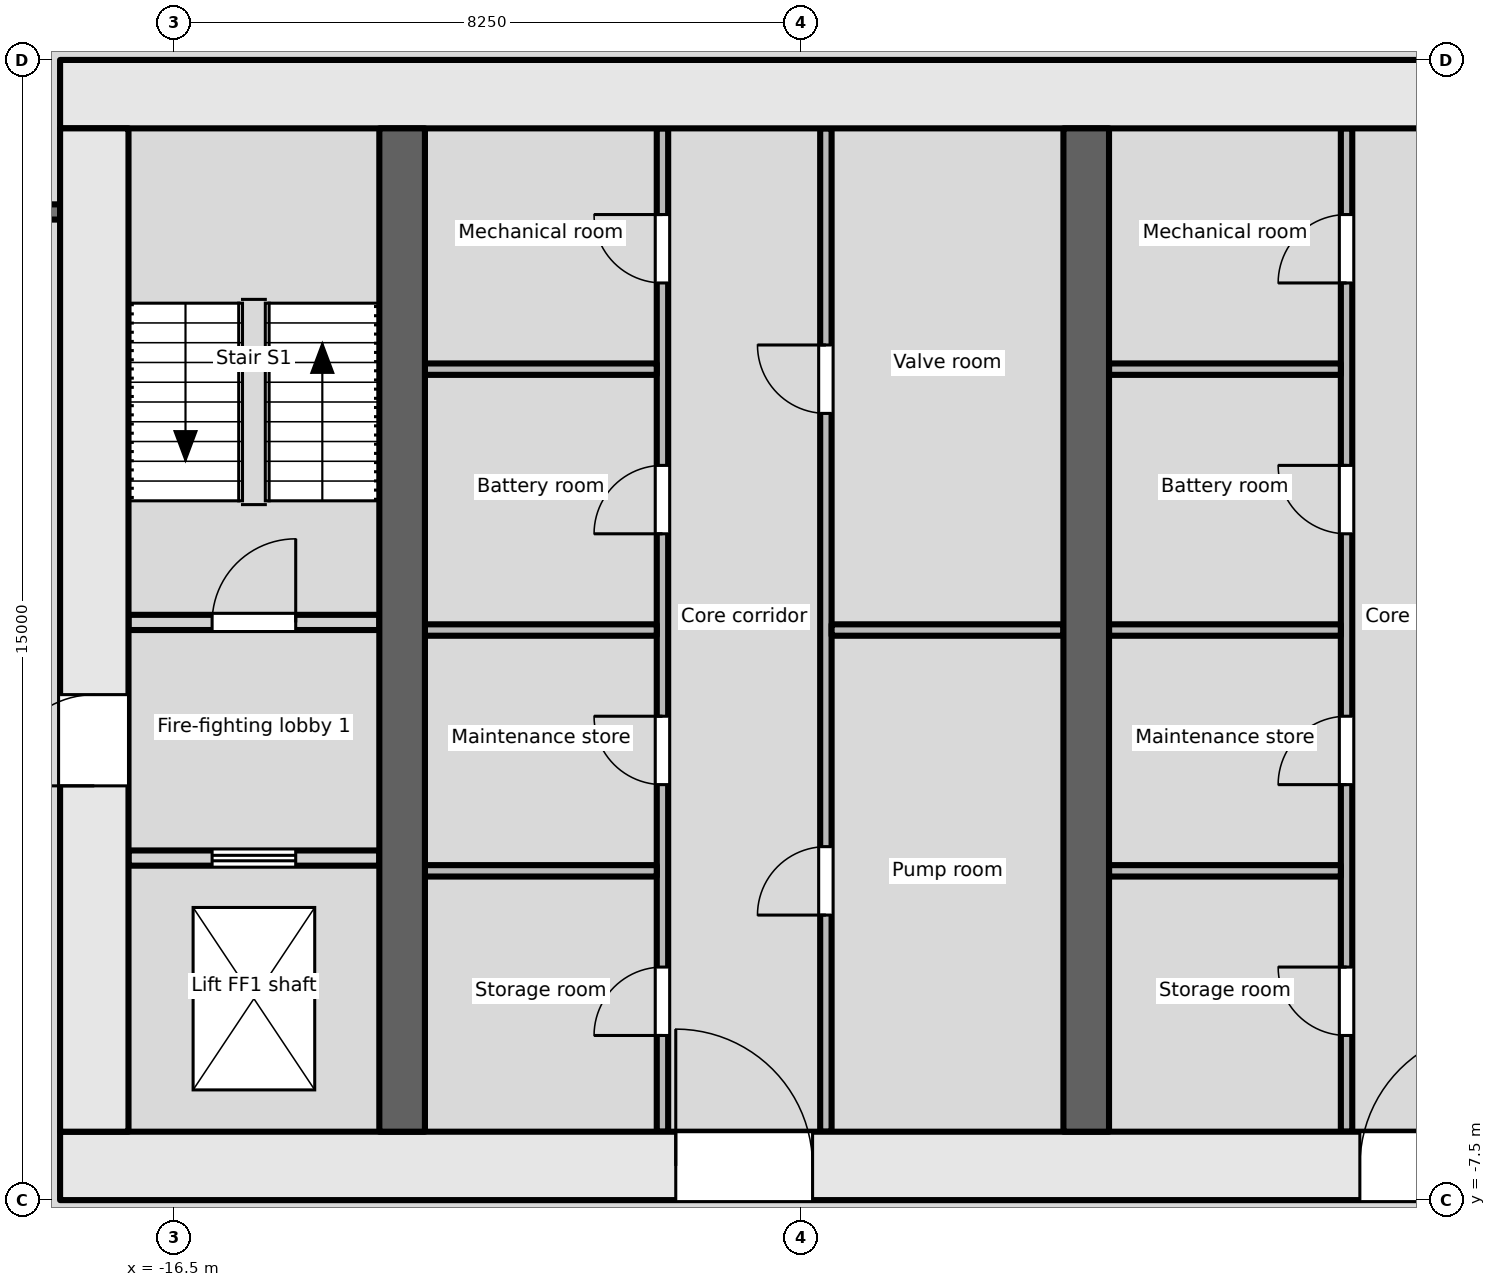
"""IFC4 building model, lengths in metres.
Left out: names, types, materials, properties, quantities, classifications, styles, units other than length and angle.
Written with IfcOpenShell. Run it as: python <this file> out.ifc"""

import sys

from ifc_helpers import new_model, si_unit, direction, frame, frame_2d, origin, place, context, subcontext, project, spatial, rectangle, extrude, element, fill, save


model = new_model("IFC4")
c1 = context("Model", 3, precision=1e-05, world=origin(), true_north=direction((0.0, 1.0)))
c2 = subcontext(c1, "Body", "Model", "MODEL_VIEW")
j1 = project(units=[si_unit("LENGTHUNIT", "METRE"), si_unit("PLANEANGLEUNIT", "RADIAN")], contexts=[c1])
p1 = place(None, origin())
s1 = spatial("IfcSite", under=j1, at=p1, CompositionType="ELEMENT")
p2 = place(p1, origin())
s2 = spatial("IfcBuilding", under=s1, at=p2, CompositionType="ELEMENT")
p3 = place(p2, frame((0.0, 0.0, -13.5)))
s3 = spatial("IfcBuildingStorey", under=s2, at=p3, CompositionType="ELEMENT", Elevation=-13.5)
p4 = place(p3, frame((-18.0, -7.05, -0.2), z_axis=(0.0, 0.0, 1.0), x_axis=(1.0, 0.0, 0.0)))
e1 = element("IfcWall", 1, at=p4, inside=s3, PredefinedType="SHEAR", context=c2, shape_type="SweptSolid", body=[
    extrude(rectangle(XDim=36.0, YDim=0.9, at=frame_2d((18.0, 0.0))), origin(), (0.0, 0.0, 1.0), 4.0),
])
p5 = place(p4, frame((8.1, 0.0, 0.2)))
e2 = element("IfcOpeningElement", 2, at=p5, cuts=e1, PredefinedType="OPENING", context=c2, shape_type="SweptSolid", body=[
    extrude(rectangle(XDim=1.8, YDim=2.1, at=frame_2d((0.9, 1.05))), frame((0.0, 0.46, 0.0), z_axis=(0.0, -1.0, 0.0), x_axis=(1.0, 0.0, 0.0)), (0.0, 0.0, 1.0), 0.921),
])
p6 = place(p4, frame((17.1, 0.0, 0.2)))
e3 = element("IfcOpeningElement", 3, at=p6, cuts=e1, PredefinedType="OPENING", context=c2, shape_type="SweptSolid", body=[
    extrude(rectangle(XDim=1.8, YDim=2.1, at=frame_2d((0.9, 1.05))), frame((0.0, 0.46, 0.0), z_axis=(0.0, -1.0, 0.0), x_axis=(1.0, 0.0, 0.0)), (0.0, 0.0, 1.0), 0.921),
])
p7 = place(p4, frame((26.1, 0.0, 0.2)))
e4 = element("IfcOpeningElement", 4, at=p7, cuts=e1, PredefinedType="OPENING", context=c2, shape_type="SweptSolid", body=[
    extrude(rectangle(XDim=2.4, YDim=2.1, at=frame_2d((1.2, 1.05))), frame((0.0, 0.46, 0.0), z_axis=(0.0, -1.0, 0.0), x_axis=(1.0, 0.0, 0.0)), (0.0, 0.0, 1.0), 0.921),
])
p8 = place(p3, frame((-18.0, 7.05, -0.2), z_axis=(0.0, 0.0, 1.0), x_axis=(1.0, 0.0, 0.0)))
e5 = element("IfcWall", 5, at=p8, inside=s3, PredefinedType="SHEAR", context=c2, shape_type="SweptSolid", body=[
    extrude(rectangle(XDim=36.0, YDim=0.9, at=frame_2d((18.0, 0.0))), origin(), (0.0, 0.0, 1.0), 4.0),
])
p9 = place(p3, frame((-17.55, -6.6, -0.2), z_axis=(0.0, 0.0, 1.0), x_axis=(0.0, 1.0, 0.0)))
e6 = element("IfcWall", 6, at=p9, inside=s3, PredefinedType="SHEAR", context=c2, shape_type="SweptSolid", body=[
    extrude(rectangle(XDim=13.2, YDim=0.9, at=frame_2d((6.6, 0.0))), origin(), (0.0, 0.0, 1.0), 4.0),
])
p10 = place(p9, frame((4.55, 0.0, 0.2)))
e7 = element("IfcOpeningElement", 7, at=p10, cuts=e6, PredefinedType="OPENING", context=c2, shape_type="SweptSolid", body=[
    extrude(rectangle(XDim=1.2, YDim=2.1, at=frame_2d((0.6, 1.05))), frame((0.0, 0.46, 0.0), z_axis=(0.0, -1.0, 0.0), x_axis=(1.0, 0.0, 0.0)), (0.0, 0.0, 1.0), 0.921),
])
for number, where, z_axis, x_axis in (
    (8, (-13.5, -6.6, -0.2), (0.0, 0.0, 1.0), (0.0, 1.0, 0.0)),
    (9, (-4.5, -6.6, -0.2), (0.0, 0.0, 1.0), (0.0, 1.0, 0.0)),
):
    element("IfcWall", number, at=place(p3, frame(where, z_axis=z_axis, x_axis=x_axis)), inside=s3, PredefinedType="SHEAR", context=c2, shape_type="SweptSolid", body=[
        extrude(rectangle(XDim=13.2, YDim=0.6, at=frame_2d((6.6, 0.0))), origin(), (0.0, 0.0, 1.0), 4.0),
    ])
p11 = place(p3, frame((-17.1, -3.0, 0.0), z_axis=(0.0, 0.0, 1.0), x_axis=(1.0, 0.0, 0.0)))
e10 = element("IfcWall", 10, at=p11, inside=s3, PredefinedType="PARTITIONING", context=c2, shape_type="SweptSolid", body=[
    extrude(rectangle(XDim=3.3, YDim=0.2, at=frame_2d((1.65, 0.0))), origin(), (0.0, 0.0, 1.0), 3.8),
])
p12 = place(p11, frame((1.1, 0.0, 0.0)))
e11 = element("IfcOpeningElement", 11, at=p12, cuts=e10, PredefinedType="OPENING", context=c2, shape_type="SweptSolid", body=[
    extrude(rectangle(XDim=1.1, YDim=2.1, at=frame_2d((0.55, 1.05))), frame((0.0, 0.111, 0.0), z_axis=(0.0, -1.0, 0.0), x_axis=(1.0, 0.0, 0.0)), (0.0, 0.0, 1.0), 0.221),
])
p13 = place(p3, frame((-17.1, 0.1, 0.0), z_axis=(0.0, 0.0, 1.0), x_axis=(1.0, 0.0, 0.0)))
e12 = element("IfcWall", 12, at=p13, inside=s3, PredefinedType="PARTITIONING", context=c2, shape_type="SweptSolid", body=[
    extrude(rectangle(XDim=3.3, YDim=0.2, at=frame_2d((1.65, 0.0))), origin(), (0.0, 0.0, 1.0), 3.8),
])
p14 = place(p13, frame((1.1, 0.0, 0.0)))
e13 = element("IfcOpeningElement", 13, at=p14, cuts=e12, PredefinedType="OPENING", context=c2, shape_type="SweptSolid", body=[
    extrude(rectangle(XDim=1.1, YDim=2.1, at=frame_2d((0.55, 1.05))), frame((0.0, 0.111, 0.0), z_axis=(0.0, -1.0, 0.0), x_axis=(1.0, 0.0, 0.0)), (0.0, 0.0, 1.0), 0.221),
])
p15 = place(p3, frame((-10.075, -6.6, 0.0), z_axis=(0.0, 0.0, 1.0), x_axis=(0.0, 1.0, 0.0)))
e14 = element("IfcWall", 14, at=p15, inside=s3, PredefinedType="PARTITIONING", context=c2, shape_type="SweptSolid", body=[
    extrude(rectangle(XDim=13.2, YDim=0.15, at=frame_2d((6.6, 0.0))), origin(), (0.0, 0.0, 1.0), 3.8),
])
p16 = place(p15, frame((1.266, 0.0, 0.0)))
e15 = element("IfcOpeningElement", 15, at=p16, cuts=e14, PredefinedType="OPENING", context=c2, shape_type="SweptSolid", body=[
    extrude(rectangle(XDim=0.9, YDim=2.1, at=frame_2d((0.45, 1.05))), frame((0.0, 0.085, 0.0), z_axis=(0.0, -1.0, 0.0), x_axis=(1.0, 0.0, 0.0)), (0.0, 0.0, 1.0), 0.171),
])
p17 = place(p15, frame((4.566, 0.0, 0.0)))
e16 = element("IfcOpeningElement", 16, at=p17, cuts=e14, PredefinedType="OPENING", context=c2, shape_type="SweptSolid", body=[
    extrude(rectangle(XDim=0.9, YDim=2.1, at=frame_2d((0.45, 1.05))), frame((0.0, 0.085, 0.0), z_axis=(0.0, -1.0, 0.0), x_axis=(1.0, 0.0, 0.0)), (0.0, 0.0, 1.0), 0.171),
])
p18 = place(p15, frame((7.866, 0.0, 0.0)))
e17 = element("IfcOpeningElement", 17, at=p18, cuts=e14, PredefinedType="OPENING", context=c2, shape_type="SweptSolid", body=[
    extrude(rectangle(XDim=0.9, YDim=2.1, at=frame_2d((0.45, 1.05))), frame((0.0, 0.085, 0.0), z_axis=(0.0, -1.0, 0.0), x_axis=(1.0, 0.0, 0.0)), (0.0, 0.0, 1.0), 0.171),
])
p19 = place(p15, frame((11.166, 0.0, 0.0)))
e18 = element("IfcOpeningElement", 18, at=p19, cuts=e14, PredefinedType="OPENING", context=c2, shape_type="SweptSolid", body=[
    extrude(rectangle(XDim=0.9, YDim=2.1, at=frame_2d((0.45, 1.05))), frame((0.0, 0.085, 0.0), z_axis=(0.0, -1.0, 0.0), x_axis=(1.0, 0.0, 0.0)), (0.0, 0.0, 1.0), 0.171),
])
for number, where, z_axis, x_axis in (
    (19, (-13.2, -3.168, 0.0), (0.0, 0.0, 1.0), (1.0, 0.0, 0.0)),
    (20, (-13.2, 0.0, 0.0), (0.0, 0.0, 1.0), (1.0, 0.0, 0.0)),
    (21, (-13.2, 3.432, 0.0), (0.0, 0.0, 1.0), (1.0, 0.0, 0.0)),
):
    element("IfcWall", number, at=place(p3, frame(where, z_axis=z_axis, x_axis=x_axis)), inside=s3, PredefinedType="PARTITIONING", context=c2, shape_type="SweptSolid", body=[
        extrude(rectangle(XDim=3.05, YDim=0.15, at=frame_2d((1.525, 0.0))), origin(), (0.0, 0.0, 1.0), 3.8),
    ])
p20 = place(p3, frame((-7.925, -6.6, 0.0), z_axis=(0.0, 0.0, 1.0), x_axis=(0.0, 1.0, 0.0)))
e22 = element("IfcWall", 22, at=p20, inside=s3, PredefinedType="PARTITIONING", context=c2, shape_type="SweptSolid", body=[
    extrude(rectangle(XDim=13.2, YDim=0.15, at=frame_2d((6.6, 0.0))), origin(), (0.0, 0.0, 1.0), 3.8),
])
p21 = place(p20, frame((2.85, 0.0, 0.0)))
e23 = element("IfcOpeningElement", 23, at=p21, cuts=e22, PredefinedType="OPENING", context=c2, shape_type="SweptSolid", body=[
    extrude(rectangle(XDim=0.9, YDim=2.1, at=frame_2d((0.45, 1.05))), frame((0.0, 0.085, 0.0), z_axis=(0.0, -1.0, 0.0), x_axis=(1.0, 0.0, 0.0)), (0.0, 0.0, 1.0), 0.171),
])
p22 = place(p20, frame((9.45, 0.0, 0.0)))
e24 = element("IfcOpeningElement", 24, at=p22, cuts=e22, PredefinedType="OPENING", context=c2, shape_type="SweptSolid", body=[
    extrude(rectangle(XDim=0.9, YDim=2.1, at=frame_2d((0.45, 1.05))), frame((0.0, 0.085, 0.0), z_axis=(0.0, -1.0, 0.0), x_axis=(1.0, 0.0, 0.0)), (0.0, 0.0, 1.0), 0.171),
])
p23 = place(p3, frame((-7.85, 0.0, 0.0), z_axis=(0.0, 0.0, 1.0), x_axis=(1.0, 0.0, 0.0)))
e25 = element("IfcWall", 25, at=p23, inside=s3, PredefinedType="PARTITIONING", context=c2, shape_type="SweptSolid", body=[
    extrude(rectangle(XDim=3.05, YDim=0.15, at=frame_2d((1.525, 0.0))), origin(), (0.0, 0.0, 1.0), 3.8),
])
p24 = place(p3, frame((-1.075, -6.6, 0.0), z_axis=(0.0, 0.0, 1.0), x_axis=(0.0, 1.0, 0.0)))
e26 = element("IfcWall", 26, at=p24, inside=s3, PredefinedType="PARTITIONING", context=c2, shape_type="SweptSolid", body=[
    extrude(rectangle(XDim=13.2, YDim=0.15, at=frame_2d((6.6, 0.0))), origin(), (0.0, 0.0, 1.0), 3.8),
])
p25 = place(p24, frame((1.266, 0.0, 0.0)))
e27 = element("IfcOpeningElement", 27, at=p25, cuts=e26, PredefinedType="OPENING", context=c2, shape_type="SweptSolid", body=[
    extrude(rectangle(XDim=0.9, YDim=2.1, at=frame_2d((0.45, 1.05))), frame((0.0, 0.085, 0.0), z_axis=(0.0, -1.0, 0.0), x_axis=(1.0, 0.0, 0.0)), (0.0, 0.0, 1.0), 0.171),
])
p26 = place(p24, frame((4.566, 0.0, 0.0)))
e28 = element("IfcOpeningElement", 28, at=p26, cuts=e26, PredefinedType="OPENING", context=c2, shape_type="SweptSolid", body=[
    extrude(rectangle(XDim=0.9, YDim=2.1, at=frame_2d((0.45, 1.05))), frame((0.0, 0.085, 0.0), z_axis=(0.0, -1.0, 0.0), x_axis=(1.0, 0.0, 0.0)), (0.0, 0.0, 1.0), 0.171),
])
p27 = place(p24, frame((7.866, 0.0, 0.0)))
e29 = element("IfcOpeningElement", 29, at=p27, cuts=e26, PredefinedType="OPENING", context=c2, shape_type="SweptSolid", body=[
    extrude(rectangle(XDim=0.9, YDim=2.1, at=frame_2d((0.45, 1.05))), frame((0.0, 0.085, 0.0), z_axis=(0.0, -1.0, 0.0), x_axis=(1.0, 0.0, 0.0)), (0.0, 0.0, 1.0), 0.171),
])
p28 = place(p24, frame((11.166, 0.0, 0.0)))
e30 = element("IfcOpeningElement", 30, at=p28, cuts=e26, PredefinedType="OPENING", context=c2, shape_type="SweptSolid", body=[
    extrude(rectangle(XDim=0.9, YDim=2.1, at=frame_2d((0.45, 1.05))), frame((0.0, 0.085, 0.0), z_axis=(0.0, -1.0, 0.0), x_axis=(1.0, 0.0, 0.0)), (0.0, 0.0, 1.0), 0.171),
])
for number, where, z_axis, x_axis in (
    (31, (-4.2, -3.168, 0.0), (0.0, 0.0, 1.0), (1.0, 0.0, 0.0)),
    (32, (-4.2, 0.0, 0.0), (0.0, 0.0, 1.0), (1.0, 0.0, 0.0)),
    (33, (-4.2, 3.432, 0.0), (0.0, 0.0, 1.0), (1.0, 0.0, 0.0)),
):
    element("IfcWall", number, at=place(p3, frame(where, z_axis=z_axis, x_axis=x_axis)), inside=s3, PredefinedType="PARTITIONING", context=c2, shape_type="SweptSolid", body=[
        extrude(rectangle(XDim=3.05, YDim=0.15, at=frame_2d((1.525, 0.0))), origin(), (0.0, 0.0, 1.0), 3.8),
    ])
p29 = place(p3, frame((-20.4, 5.5, 0.0), z_axis=(0.0, 0.0, 1.0), x_axis=(1.0, 0.0, 0.0)))
e34 = element("IfcWall", 34, at=p29, inside=s3, PredefinedType="PARTITIONING", context=c2, shape_type="SweptSolid", body=[
    extrude(rectangle(XDim=2.4, YDim=0.2, at=frame_2d((1.2, 0.0))), origin(), (0.0, 0.0, 1.0), 3.8),
])
p30 = place(p29, frame((0.75, 0.0, 0.0)))
e35 = element("IfcOpeningElement", 35, at=p30, cuts=e34, PredefinedType="OPENING", context=c2, shape_type="SweptSolid", body=[
    extrude(rectangle(XDim=0.9, YDim=2.1, at=frame_2d((0.45, 1.05))), frame((0.0, 0.111, 0.0), z_axis=(0.0, -1.0, 0.0), x_axis=(1.0, 0.0, 0.0)), (0.0, 0.0, 1.0), 0.221),
])
p31 = place(p12, origin())
e36 = element("IfcDoor", 36, at=p31, inside=s3, OperationType="DOUBLE_DOOR_SLIDING", PredefinedType="DOOR", context=c2, shape_type="SweptSolid", body=[
    extrude(rectangle(XDim=1.1, YDim=2.1, at=frame_2d((0.55, 1.05))), frame((0.0, 0.025, 0.0), z_axis=(0.0, -1.0, 0.0), x_axis=(1.0, 0.0, 0.0)), (0.0, 0.0, 1.0), 0.05),
])
fill(e11, e36)
p32 = place(p10, origin())
e37 = element("IfcDoor", 37, at=p32, inside=s3, OperationType="SINGLE_SWING_LEFT", PredefinedType="DOOR", context=c2, shape_type="SweptSolid", body=[
    extrude(rectangle(XDim=1.2, YDim=2.1, at=frame_2d((0.6, 1.05))), frame((0.0, 0.025, 0.0), z_axis=(0.0, -1.0, 0.0), x_axis=(1.0, 0.0, 0.0)), (0.0, 0.0, 1.0), 0.05),
])
fill(e7, e37)
p33 = place(p14, origin())
e38 = element("IfcDoor", 38, at=p33, inside=s3, OperationType="SINGLE_SWING_RIGHT", PredefinedType="DOOR", context=c2, shape_type="SweptSolid", body=[
    extrude(rectangle(XDim=1.1, YDim=2.1, at=frame_2d((0.55, 1.05))), frame((0.0, 0.025, 0.0), z_axis=(0.0, -1.0, 0.0), x_axis=(1.0, 0.0, 0.0)), (0.0, 0.0, 1.0), 0.05),
])
fill(e13, e38)
p34 = place(p16, origin())
e39 = element("IfcDoor", 39, at=p34, inside=s3, OperationType="SINGLE_SWING_LEFT", PredefinedType="DOOR", context=c2, shape_type="SweptSolid", body=[
    extrude(rectangle(XDim=0.9, YDim=2.1, at=frame_2d((0.45, 1.05))), frame((0.0, 0.025, 0.0), z_axis=(0.0, -1.0, 0.0), x_axis=(1.0, 0.0, 0.0)), (0.0, 0.0, 1.0), 0.05),
])
fill(e15, e39)
p35 = place(p17, origin())
e40 = element("IfcDoor", 40, at=p35, inside=s3, OperationType="SINGLE_SWING_RIGHT", PredefinedType="DOOR", context=c2, shape_type="SweptSolid", body=[
    extrude(rectangle(XDim=0.9, YDim=2.1, at=frame_2d((0.45, 1.05))), frame((0.0, 0.025, 0.0), z_axis=(0.0, -1.0, 0.0), x_axis=(1.0, 0.0, 0.0)), (0.0, 0.0, 1.0), 0.05),
])
fill(e16, e40)
p36 = place(p18, origin())
e41 = element("IfcDoor", 41, at=p36, inside=s3, OperationType="SINGLE_SWING_LEFT", PredefinedType="DOOR", context=c2, shape_type="SweptSolid", body=[
    extrude(rectangle(XDim=0.9, YDim=2.1, at=frame_2d((0.45, 1.05))), frame((0.0, 0.025, 0.0), z_axis=(0.0, -1.0, 0.0), x_axis=(1.0, 0.0, 0.0)), (0.0, 0.0, 1.0), 0.05),
])
fill(e17, e41)
p37 = place(p19, origin())
e42 = element("IfcDoor", 42, at=p37, inside=s3, OperationType="SINGLE_SWING_RIGHT", PredefinedType="DOOR", context=c2, shape_type="SweptSolid", body=[
    extrude(rectangle(XDim=0.9, YDim=2.1, at=frame_2d((0.45, 1.05))), frame((0.0, 0.025, 0.0), z_axis=(0.0, -1.0, 0.0), x_axis=(1.0, 0.0, 0.0)), (0.0, 0.0, 1.0), 0.05),
])
fill(e18, e42)
p38 = place(p21, origin())
e43 = element("IfcDoor", 43, at=p38, inside=s3, OperationType="SINGLE_SWING_LEFT", PredefinedType="DOOR", context=c2, shape_type="SweptSolid", body=[
    extrude(rectangle(XDim=0.9, YDim=2.1, at=frame_2d((0.45, 1.05))), frame((0.0, 0.025, 0.0), z_axis=(0.0, -1.0, 0.0), x_axis=(1.0, 0.0, 0.0)), (0.0, 0.0, 1.0), 0.05),
])
fill(e23, e43)
p39 = place(p22, origin())
e44 = element("IfcDoor", 44, at=p39, inside=s3, OperationType="SINGLE_SWING_RIGHT", PredefinedType="DOOR", context=c2, shape_type="SweptSolid", body=[
    extrude(rectangle(XDim=0.9, YDim=2.1, at=frame_2d((0.45, 1.05))), frame((0.0, 0.025, 0.0), z_axis=(0.0, -1.0, 0.0), x_axis=(1.0, 0.0, 0.0)), (0.0, 0.0, 1.0), 0.05),
])
fill(e24, e44)
p40 = place(p5, origin())
e45 = element("IfcDoor", 45, at=p40, inside=s3, OperationType="SINGLE_SWING_LEFT", PredefinedType="DOOR", context=c2, shape_type="SweptSolid", body=[
    extrude(rectangle(XDim=1.8, YDim=2.1, at=frame_2d((0.9, 1.05))), frame((0.0, 0.025, 0.0), z_axis=(0.0, -1.0, 0.0), x_axis=(1.0, 0.0, 0.0)), (0.0, 0.0, 1.0), 0.05),
])
fill(e2, e45)
p41 = place(p25, origin())
e46 = element("IfcDoor", 46, at=p41, inside=s3, OperationType="SINGLE_SWING_RIGHT", PredefinedType="DOOR", context=c2, shape_type="SweptSolid", body=[
    extrude(rectangle(XDim=0.9, YDim=2.1, at=frame_2d((0.45, 1.05))), frame((0.0, 0.025, 0.0), z_axis=(0.0, -1.0, 0.0), x_axis=(1.0, 0.0, 0.0)), (0.0, 0.0, 1.0), 0.05),
])
fill(e27, e46)
p42 = place(p26, origin())
e47 = element("IfcDoor", 47, at=p42, inside=s3, OperationType="SINGLE_SWING_LEFT", PredefinedType="DOOR", context=c2, shape_type="SweptSolid", body=[
    extrude(rectangle(XDim=0.9, YDim=2.1, at=frame_2d((0.45, 1.05))), frame((0.0, 0.025, 0.0), z_axis=(0.0, -1.0, 0.0), x_axis=(1.0, 0.0, 0.0)), (0.0, 0.0, 1.0), 0.05),
])
fill(e28, e47)
p43 = place(p27, origin())
e48 = element("IfcDoor", 48, at=p43, inside=s3, OperationType="SINGLE_SWING_RIGHT", PredefinedType="DOOR", context=c2, shape_type="SweptSolid", body=[
    extrude(rectangle(XDim=0.9, YDim=2.1, at=frame_2d((0.45, 1.05))), frame((0.0, 0.025, 0.0), z_axis=(0.0, -1.0, 0.0), x_axis=(1.0, 0.0, 0.0)), (0.0, 0.0, 1.0), 0.05),
])
fill(e29, e48)
p44 = place(p28, origin())
e49 = element("IfcDoor", 49, at=p44, inside=s3, OperationType="SINGLE_SWING_LEFT", PredefinedType="DOOR", context=c2, shape_type="SweptSolid", body=[
    extrude(rectangle(XDim=0.9, YDim=2.1, at=frame_2d((0.45, 1.05))), frame((0.0, 0.025, 0.0), z_axis=(0.0, -1.0, 0.0), x_axis=(1.0, 0.0, 0.0)), (0.0, 0.0, 1.0), 0.05),
])
fill(e30, e49)
p45 = place(p6, origin())
e50 = element("IfcDoor", 50, at=p45, inside=s3, OperationType="SINGLE_SWING_RIGHT", PredefinedType="DOOR", context=c2, shape_type="SweptSolid", body=[
    extrude(rectangle(XDim=1.8, YDim=2.1, at=frame_2d((0.9, 1.05))), frame((0.0, 0.025, 0.0), z_axis=(0.0, -1.0, 0.0), x_axis=(1.0, 0.0, 0.0)), (0.0, 0.0, 1.0), 0.05),
])
fill(e3, e50)
save(model, sys.argv[1])
